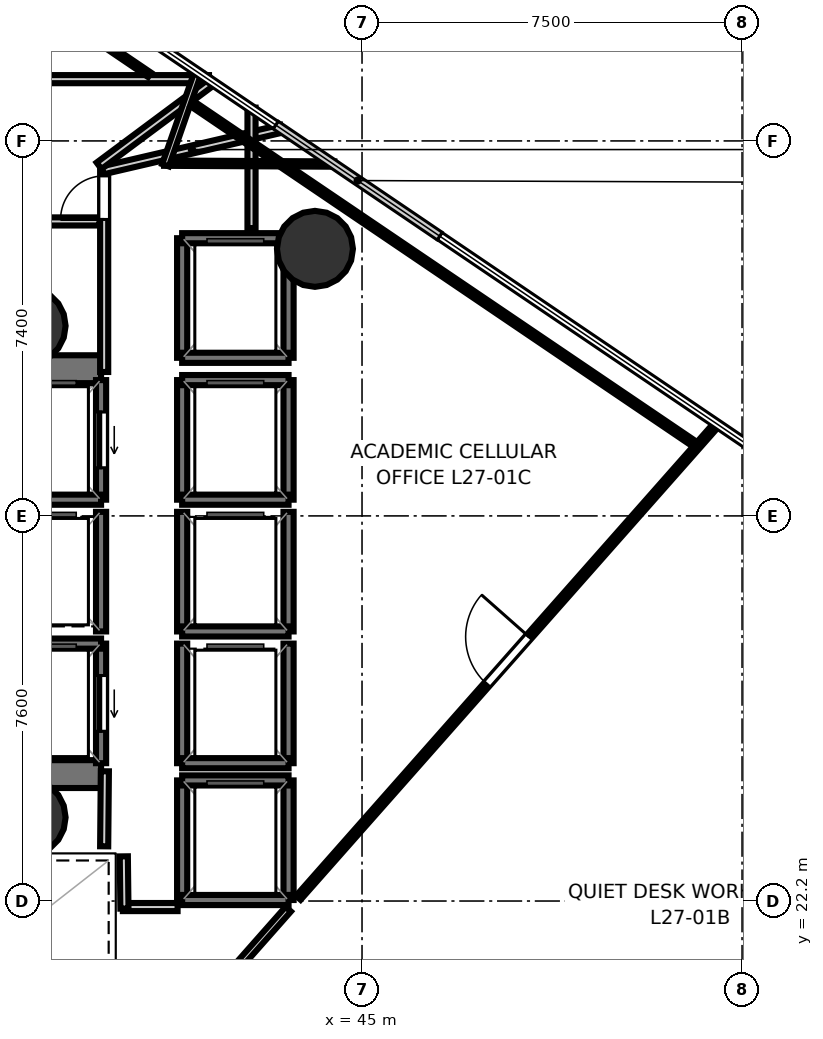
"""IFC4 building model, lengths in metres.
Left out: names, types, materials, properties, quantities, classifications, styles, units other than length and angle.
Written with IfcOpenShell. Run it as: python <this file> out.ifc"""

import sys

from ifc_helpers import new_model, si_unit, direction, frame, frame_2d, origin, origin_2d, place, context, subcontext, project, spatial, rectangle, hollow_circle, extrude, element, fill, save


model = new_model("IFC4")
c1 = context("Model", 3, precision=1e-05, world=origin(), true_north=direction((0.0, 1.0)))
c2 = subcontext(c1, "Body", "Model", "MODEL_VIEW")
j1 = project(units=[si_unit("LENGTHUNIT", "METRE"), si_unit("PLANEANGLEUNIT", "RADIAN")], contexts=[c1])
p1 = place(None, origin())
s1 = spatial("IfcSite", under=j1, at=p1, CompositionType="ELEMENT")
p2 = place(p1, origin())
s2 = spatial("IfcBuilding", under=s1, at=p2, CompositionType="ELEMENT")
p3 = place(p2, frame((0.0, 0.0, 108.9)))
s3 = spatial("IfcBuildingStorey", under=s2, at=p3, CompositionType="ELEMENT", Elevation=108.9)
p4 = place(p3, frame((29.23, 32.695, 0.0), z_axis=(0.0, 0.0, 1.0), x_axis=(1.0, 0.0, 0.0)))
e1 = element("IfcWall", 1, at=p4, inside=s3, PredefinedType="SHEAR", context=c2, shape_type="SweptSolid", body=[
    extrude(rectangle(XDim=10.62, YDim=0.55, at=frame_2d((5.31, 0.0))), origin(), (0.0, 0.0, 1.0), 3.52),
])
p5 = place(p4, frame((0.995, 0.0, 0.0)))
e2 = element("IfcOpeningElement", 2, at=p5, cuts=e1, PredefinedType="OPENING", context=c2, shape_type="SweptSolid", body=[
    extrude(rectangle(XDim=1.25, YDim=2.15, at=frame_2d((0.625, 1.075))), frame((0.0, 0.285, 0.0), z_axis=(0.0, -1.0, 0.0), x_axis=(1.0, 0.0, 0.0)), (0.0, 0.0, 1.0), 0.57),
])
p6 = place(p3, frame((29.23, 24.705, 0.0), z_axis=(0.0, 0.0, 1.0), x_axis=(1.0, 0.0, 0.0)))
e3 = element("IfcWall", 3, at=p6, inside=s3, PredefinedType="SHEAR", context=c2, shape_type="SweptSolid", body=[
    extrude(rectangle(XDim=10.62, YDim=0.55, at=frame_2d((5.31, 0.0))), origin(), (0.0, 0.0, 1.0), 3.52),
])
p7 = place(p6, frame((0.795, 0.0, 0.0)))
e4 = element("IfcOpeningElement", 4, at=p7, cuts=e3, PredefinedType="OPENING", context=c2, shape_type="SweptSolid", body=[
    extrude(rectangle(XDim=1.25, YDim=2.15, at=frame_2d((0.625, 1.075))), frame((0.0, 0.285, 0.0), z_axis=(0.0, -1.0, 0.0), x_axis=(1.0, 0.0, 0.0)), (0.0, 0.0, 1.0), 0.57),
])
for number, where, z_axis, x_axis in (
    (5, (38.4, 33.55, 0.0), (0.0, 0.0, 1.0), (1.0, 0.0, 0.0)),
    (6, (38.4, 23.85, 0.0), (0.0, 0.0, 1.0), (1.0, 0.0, 0.0)),
    (7, (44.071, 35.07, 0.0), (0.0, 0.0, 1.0), (1.0, 0.0, 0.0)),
):
    element("IfcColumn", number, at=place(p3, frame(where, z_axis=z_axis, x_axis=x_axis)), inside=s3, PredefinedType="COLUMN", context=c2, shape_type="SweptSolid", body=[
        extrude(hollow_circle(Radius=0.75, WallThickness=0.036, at=origin_2d()), origin(), (0.0, 0.0, 1.0), 3.7),
    ])
p8 = place(p3, frame((39.85, 30.12, 0.0), z_axis=(0.0, 0.0, 1.0), x_axis=(0.0, 1.0, 0.0)))
e8 = element("IfcWall", 8, at=p8, inside=s3, PredefinedType="SOLIDWALL", context=c2, shape_type="SweptSolid", body=[
    extrude(rectangle(XDim=2.36, YDim=0.2, at=frame_2d((1.18, 0.0))), origin(), (0.0, 0.0, 1.0), 3.52),
])
p9 = place(p8, frame((0.63, 0.0, 0.0)))
e9 = element("IfcOpeningElement", 9, at=p9, cuts=e8, PredefinedType="OPENING", context=c2, shape_type="SweptSolid", body=[
    extrude(rectangle(XDim=1.1, YDim=2.15, at=frame_2d((0.55, 1.075))), frame((0.0, 0.11, 0.0), z_axis=(0.0, -1.0, 0.0), x_axis=(1.0, 0.0, 0.0)), (0.0, 0.0, 1.0), 0.22),
])
p10 = place(p3, frame((37.75, 30.12, 0.0), z_axis=(0.0, 0.0, 1.0), x_axis=(1.0, 0.0, 0.0)))
e10 = element("IfcWall", 10, at=p10, inside=s3, PredefinedType="SOLIDWALL", context=c2, shape_type="SweptSolid", body=[
    extrude(rectangle(XDim=2.1, YDim=0.2, at=frame_2d((1.05, 0.0))), origin(), (0.0, 0.0, 1.0), 3.52),
])
p11 = place(p3, frame((39.85, 24.92, 0.0), z_axis=(0.0, 0.0, 1.0), x_axis=(0.0, 1.0, 0.0)))
e11 = element("IfcWall", 11, at=p11, inside=s3, PredefinedType="SOLIDWALL", context=c2, shape_type="SweptSolid", body=[
    extrude(rectangle(XDim=2.36, YDim=0.2, at=frame_2d((1.18, 0.0))), origin(), (0.0, 0.0, 1.0), 3.52),
])
p12 = place(p11, frame((0.63, 0.0, 0.0)))
e12 = element("IfcOpeningElement", 12, at=p12, cuts=e11, PredefinedType="OPENING", context=c2, shape_type="SweptSolid", body=[
    extrude(rectangle(XDim=1.1, YDim=2.15, at=frame_2d((0.55, 1.075))), frame((0.0, 0.11, 0.0), z_axis=(0.0, -1.0, 0.0), x_axis=(1.0, 0.0, 0.0)), (0.0, 0.0, 1.0), 0.22),
])
p13 = place(p3, frame((37.75, 27.28, 0.0), z_axis=(0.0, 0.0, 1.0), x_axis=(1.0, 0.0, 0.0)))
e13 = element("IfcWall", 13, at=p13, inside=s3, PredefinedType="SOLIDWALL", context=c2, shape_type="SweptSolid", body=[
    extrude(rectangle(XDim=2.1, YDim=0.2, at=frame_2d((1.05, 0.0))), origin(), (0.0, 0.0, 1.0), 3.52),
])
for number, where, z_axis, x_axis in (
    (14, (43.55, 30.12, 0.0), (0.0, 0.0, 1.0), (0.0, 1.0, 0.0)),
    (15, (41.45, 30.12, 0.0), (0.0, 0.0, 1.0), (0.0, 1.0, 0.0)),
):
    element("IfcWall", number, at=place(p3, frame(where, z_axis=z_axis, x_axis=x_axis)), inside=s3, PredefinedType="SOLIDWALL", context=c2, shape_type="SweptSolid", body=[
        extrude(rectangle(XDim=2.36, YDim=0.2, at=frame_2d((1.18, 0.0))), origin(), (0.0, 0.0, 1.0), 3.52),
    ])
for number, where, z_axis, x_axis in (
    (16, (41.45, 32.48, 0.0), (0.0, 0.0, 1.0), (1.0, 0.0, 0.0)),
    (17, (41.45, 30.12, 0.0), (0.0, 0.0, 1.0), (1.0, 0.0, 0.0)),
):
    element("IfcWall", number, at=place(p3, frame(where, z_axis=z_axis, x_axis=x_axis)), inside=s3, PredefinedType="SOLIDWALL", context=c2, shape_type="SweptSolid", body=[
        extrude(rectangle(XDim=2.1, YDim=0.2, at=frame_2d((1.05, 0.0))), origin(), (0.0, 0.0, 1.0), 3.52),
    ])
for number, where, z_axis, x_axis in (
    (18, (43.55, 27.52, 0.0), (0.0, 0.0, 1.0), (0.0, 1.0, 0.0)),
    (19, (41.45, 27.52, 0.0), (0.0, 0.0, 1.0), (0.0, 1.0, 0.0)),
):
    element("IfcWall", number, at=place(p3, frame(where, z_axis=z_axis, x_axis=x_axis)), inside=s3, PredefinedType="SOLIDWALL", context=c2, shape_type="SweptSolid", body=[
        extrude(rectangle(XDim=2.36, YDim=0.2, at=frame_2d((1.18, 0.0))), origin(), (0.0, 0.0, 1.0), 3.52),
    ])
p14 = place(p3, frame((41.45, 27.52, 0.0), z_axis=(0.0, 0.0, 1.0), x_axis=(1.0, 0.0, 0.0)))
e20 = element("IfcWall", 20, at=p14, inside=s3, PredefinedType="SOLIDWALL", context=c2, shape_type="SweptSolid", body=[
    extrude(rectangle(XDim=2.1, YDim=0.2, at=frame_2d((1.05, 0.0))), origin(), (0.0, 0.0, 1.0), 3.52),
])
for number, where, z_axis, x_axis in (
    (21, (43.55, 24.92, 0.0), (0.0, 0.0, 1.0), (0.0, 1.0, 0.0)),
    (22, (41.45, 24.92, 0.0), (0.0, 0.0, 1.0), (0.0, 1.0, 0.0)),
):
    element("IfcWall", number, at=place(p3, frame(where, z_axis=z_axis, x_axis=x_axis)), inside=s3, PredefinedType="SOLIDWALL", context=c2, shape_type="SweptSolid", body=[
        extrude(rectangle(XDim=2.36, YDim=0.2, at=frame_2d((1.18, 0.0))), origin(), (0.0, 0.0, 1.0), 3.52),
    ])
p15 = place(p3, frame((41.45, 24.92, 0.0), z_axis=(0.0, 0.0, 1.0), x_axis=(1.0, 0.0, 0.0)))
e23 = element("IfcWall", 23, at=p15, inside=s3, PredefinedType="SOLIDWALL", context=c2, shape_type="SweptSolid", body=[
    extrude(rectangle(XDim=2.1, YDim=0.2, at=frame_2d((1.05, 0.0))), origin(), (0.0, 0.0, 1.0), 3.52),
])
p16 = place(p3, frame((39.85, 27.52, 0.0), z_axis=(0.0, 0.0, 1.0), x_axis=(0.0, 1.0, 0.0)))
e24 = element("IfcWall", 24, at=p16, inside=s3, PredefinedType="SOLIDWALL", context=c2, shape_type="SweptSolid", body=[
    extrude(rectangle(XDim=2.36, YDim=0.2, at=frame_2d((1.18, 0.0))), origin(), (0.0, 0.0, 1.0), 3.52),
])
for number, where, z_axis, x_axis in (
    (25, (43.55, 22.22, 0.0), (0.0, 0.0, 1.0), (0.0, 1.0, 0.0)),
    (26, (41.45, 22.22, 0.0), (0.0, 0.0, 1.0), (0.0, 1.0, 0.0)),
):
    element("IfcWall", number, at=place(p3, frame(where, z_axis=z_axis, x_axis=x_axis)), inside=s3, PredefinedType="SOLIDWALL", context=c2, shape_type="SweptSolid", body=[
        extrude(rectangle(XDim=2.36, YDim=0.2, at=frame_2d((1.18, 0.0))), origin(), (0.0, 0.0, 1.0), 3.52),
    ])
for number, where, z_axis, x_axis in (
    (27, (41.45, 24.58, 0.0), (0.0, 0.0, 1.0), (1.0, 0.0, 0.0)),
    (28, (41.45, 22.22, 0.0), (0.0, 0.0, 1.0), (1.0, 0.0, 0.0)),
):
    element("IfcWall", number, at=place(p3, frame(where, z_axis=z_axis, x_axis=x_axis)), inside=s3, PredefinedType="SOLIDWALL", context=c2, shape_type="SweptSolid", body=[
        extrude(rectangle(XDim=2.1, YDim=0.2, at=frame_2d((1.05, 0.0))), origin(), (0.0, 0.0, 1.0), 3.52),
    ])
for number, where, z_axis, x_axis in (
    (29, (43.55, 32.92, 0.0), (0.0, 0.0, 1.0), (0.0, 1.0, 0.0)),
    (30, (41.45, 32.92, 0.0), (0.0, 0.0, 1.0), (0.0, 1.0, 0.0)),
):
    element("IfcWall", number, at=place(p3, frame(where, z_axis=z_axis, x_axis=x_axis)), inside=s3, PredefinedType="SOLIDWALL", context=c2, shape_type="SweptSolid", body=[
        extrude(rectangle(XDim=2.36, YDim=0.2, at=frame_2d((1.18, 0.0))), origin(), (0.0, 0.0, 1.0), 3.52),
    ])
for number, where, z_axis, x_axis in (
    (31, (41.45, 35.28, 0.0), (0.0, 0.0, 1.0), (1.0, 0.0, 0.0)),
    (32, (41.45, 32.92, 0.0), (0.0, 0.0, 1.0), (1.0, 0.0, 0.0)),
):
    element("IfcWall", number, at=place(p3, frame(where, z_axis=z_axis, x_axis=x_axis)), inside=s3, PredefinedType="SOLIDWALL", context=c2, shape_type="SweptSolid", body=[
        extrude(rectangle(XDim=2.1, YDim=0.2, at=frame_2d((1.05, 0.0))), origin(), (0.0, 0.0, 1.0), 3.52),
    ])
p17 = place(p3, frame((39.911, 32.64, 0.0), z_axis=(0.0, 0.0, 1.0), x_axis=(0.0, 1.0, 0.0)))
e33 = element("IfcWall", 33, at=p17, inside=s3, PredefinedType="PARTITIONING", context=c2, shape_type="SweptSolid", body=[
    extrude(rectangle(XDim=4.01, YDim=0.16, at=frame_2d((2.005, 0.0))), origin(), (0.0, 0.0, 1.0), 2.84),
])
p18 = place(p17, frame((3.01, 0.0, 0.0)))
e34 = element("IfcOpeningElement", 34, at=p18, cuts=e33, PredefinedType="OPENING", context=c2, shape_type="SweptSolid", body=[
    extrude(rectangle(XDim=0.86, YDim=2.05, at=frame_2d((0.43, 1.025))), frame((0.0, 0.09, 0.0), z_axis=(0.0, -1.0, 0.0), x_axis=(1.0, 0.0, 0.0)), (0.0, 0.0, 1.0), 0.18),
])
p19 = place(p3, frame((39.88, 36.619, 0.0), z_axis=(0.0, 0.0, 1.0), x_axis=(0.973960950435, 0.2267158288, 0.0)))
e35 = element("IfcWall", 35, at=p19, inside=s3, PredefinedType="PARTITIONING", context=c2, shape_type="SweptSolid", body=[
    extrude(rectangle(XDim=3.62, YDim=0.16, at=frame_2d((1.81, 0.0))), origin(), (0.0, 0.0, 1.0), 2.84),
])
p20 = place(p3, frame((42.819, 37.857, 0.0), z_axis=(0.0, 0.0, 1.0), x_axis=(0.0, -1.0, 0.0)))
e36 = element("IfcWall", 36, at=p20, inside=s3, PredefinedType="PARTITIONING", context=c2, shape_type="SweptSolid", body=[
    extrude(rectangle(XDim=2.377, YDim=0.16, at=frame_2d((1.188, 0.0))), origin(), (0.0, 0.0, 1.0), 2.84),
])
p21 = place(p3, frame((41.36, 22.081, 0.0), z_axis=(0.0, 0.0, 1.0), x_axis=(-1.0, 0.0, 0.0)))
e37 = element("IfcWall", 37, at=p21, inside=s3, PredefinedType="PARTITIONING", context=c2, shape_type="SweptSolid", body=[
    extrude(rectangle(XDim=1.08, YDim=0.16, at=frame_2d((0.54, 0.0))), origin(), (0.0, 0.0, 1.0), 2.84),
])
p22 = place(p3, frame((40.311, 22.05, 0.0), z_axis=(0.0, 0.0, 1.0), x_axis=(-0.011836292006, 0.999929948642, 0.0)))
e38 = element("IfcWall", 38, at=p22, inside=s3, PredefinedType="PARTITIONING", context=c2, shape_type="SweptSolid", body=[
    extrude(rectangle(XDim=1.031, YDim=0.16, at=frame_2d((0.516, 0.0))), origin(), (0.0, 0.0, 1.0), 2.84),
])
p23 = place(p3, frame((39.911, 23.28, 0.0), z_axis=(0.0, 0.0, 1.0), x_axis=(0.009397771291, 0.999955839972, 0.0)))
e39 = element("IfcWall", 39, at=p23, inside=s3, PredefinedType="PARTITIONING", context=c2, shape_type="SweptSolid", body=[
    extrude(rectangle(XDim=1.481, YDim=0.16, at=frame_2d((0.74, 0.0))), origin(), (0.0, 0.0, 1.0), 2.84),
])
p24 = place(p3, frame((26.42, 38.419, 0.0), z_axis=(0.0, 0.0, 1.0), x_axis=(1.0, 0.0, 0.0)))
e40 = element("IfcWall", 40, at=p24, inside=s3, PredefinedType="PARTITIONING", context=c2, shape_type="SweptSolid", body=[
    extrude(rectangle(XDim=15.56, YDim=0.16, at=frame_2d((7.78, 0.0))), origin(), (0.0, 0.0, 1.0), 2.84),
])
p25 = place(p24, frame((10.865, 0.0, 0.0)))
e41 = element("IfcOpeningElement", 41, at=p25, cuts=e40, PredefinedType="OPENING", context=c2, shape_type="SweptSolid", body=[
    extrude(rectangle(XDim=1.25, YDim=2.2, at=frame_2d((0.625, 1.1))), frame((0.0, 0.09, 0.0), z_axis=(0.0, -1.0, 0.0), x_axis=(1.0, 0.0, 0.0)), (0.0, 0.0, 1.0), 0.18),
])
p26 = place(p24, frame((5.532, 0.0, 0.0)))
e42 = element("IfcOpeningElement", 42, at=p26, cuts=e40, PredefinedType="OPENING", context=c2, shape_type="SweptSolid", body=[
    extrude(rectangle(XDim=1.25, YDim=2.2, at=frame_2d((0.625, 1.1))), frame((0.0, 0.09, 0.0), z_axis=(0.0, -1.0, 0.0), x_axis=(1.0, 0.0, 0.0)), (0.0, 0.0, 1.0), 0.18),
])
p27 = place(p3, frame((42.053, 38.379, 0.0), z_axis=(0.0, 0.0, 1.0), x_axis=(-0.802246834953, -0.596992475504, 0.0)))
e43 = element("IfcWall", 43, at=p27, inside=s3, PredefinedType="PARTITIONING", context=c2, shape_type="SweptSolid", body=[
    extrude(rectangle(XDim=2.796, YDim=0.16, at=frame_2d((1.398, 0.0))), origin(), (0.0, 0.0, 1.0), 2.84),
])
p28 = place(p3, frame((39.818, 35.611, 0.0), z_axis=(0.0, 0.0, 1.0), x_axis=(-1.0, 0.0, 0.0)))
e44 = element("IfcWall", 44, at=p28, inside=s3, PredefinedType="PARTITIONING", context=c2, shape_type="SweptSolid", body=[
    extrude(rectangle(XDim=2.768, YDim=0.16, at=frame_2d((1.384, 0.0))), origin(), (0.0, 0.0, 1.0), 2.84),
])
p29 = place(p3, frame((40.303, 18.372, 0.0), z_axis=(0.0, 0.0, 1.0), x_axis=(0.662221894186, 0.749307789136, 0.0)))
e45 = element("IfcWall", 45, at=p29, inside=s3, PredefinedType="PARTITIONING", context=c2, shape_type="SweptSolid", body=[
    extrude(rectangle(XDim=4.895, YDim=0.14, at=frame_2d((2.447, 0.0))), origin(), (0.0, 0.0, 1.0), 2.84),
])
p30 = place(p3, frame((43.743, 22.264, 0.0), z_axis=(0.0, 0.0, 1.0), x_axis=(0.662202897959, 0.749324577159, 0.0)))
e46 = element("IfcWall", 46, at=p30, inside=s3, PredefinedType="PARTITIONING", context=c2, shape_type="SweptSolid", body=[
    extrude(rectangle(XDim=12.498, YDim=0.12, at=frame_2d((6.249, 0.0))), origin(), (0.0, 0.0, 1.0), 2.84),
])
p31 = place(p30, frame((5.624, 0.0, 0.0)))
e47 = element("IfcOpeningElement", 47, at=p31, cuts=e46, PredefinedType="OPENING", context=c2, shape_type="SweptSolid", body=[
    extrude(rectangle(XDim=1.25, YDim=2.2, at=frame_2d((0.625, 1.1))), frame((0.0, 0.07, 0.0), z_axis=(0.0, -1.0, 0.0), x_axis=(1.0, 0.0, 0.0)), (0.0, 0.0, 1.0), 0.14),
])
p32 = place(p3, frame((44.454, 36.743, 0.0), z_axis=(0.0, 0.0, 1.0), x_axis=(-0.999986322379, 0.005230205958, 0.0)))
e48 = element("IfcWall", 48, at=p32, inside=s3, PredefinedType="PARTITIONING", context=c2, shape_type="SweptSolid", body=[
    extrude(rectangle(XDim=3.361, YDim=0.105, at=frame_2d((1.68, 0.0))), origin(), (0.0, 0.0, 1.0), 2.84),
])
p33 = place(p3, frame((41.122, 36.72, 0.0), z_axis=(0.0, 0.0, 1.0), x_axis=(0.329225111587, 0.944251463277, 0.0)))
e49 = element("IfcWall", 49, at=p33, inside=s3, PredefinedType="PARTITIONING", context=c2, shape_type="SweptSolid", body=[
    extrude(rectangle(XDim=1.962, YDim=0.14, at=frame_2d((0.981, 0.0))), origin(), (0.0, 0.0, 1.0), 2.84),
])
p34 = place(p3, frame((41.65, 37.933, 0.0), z_axis=(0.0, 0.0, 1.0), x_axis=(0.827941747022, -0.560814107827, 0.0)))
e50 = element("IfcWall", 50, at=p34, inside=s3, PredefinedType="PARTITIONING", context=c2, shape_type="SweptSolid", body=[
    extrude(rectangle(XDim=11.895, YDim=0.12, at=frame_2d((5.948, 0.0))), origin(), (0.0, 0.0, 1.0), 2.84),
])
p35 = place(p3, frame((34.052, 43.08, 0.0), z_axis=(0.0, 0.0, 1.0), x_axis=(0.827934826591, -0.560824324471, 0.0)))
e51 = element("IfcWall", 51, at=p35, inside=s3, PredefinedType="PARTITIONING", context=c2, shape_type="SweptSolid", body=[
    extrude(rectangle(XDim=8.158, YDim=0.105, at=frame_2d((4.079, 0.0))), origin(), (0.0, 0.0, 1.0), 2.84),
])
p36 = place(p9, origin())
e52 = element("IfcDoor", 52, at=p36, inside=s3, OperationType="SLIDING_TO_LEFT", PredefinedType="DOOR", context=c2, shape_type="SweptSolid", body=[
    extrude(rectangle(XDim=1.1, YDim=2.15, at=frame_2d((0.55, 1.075))), frame((0.0, 0.025, 0.0), z_axis=(0.0, -1.0, 0.0), x_axis=(1.0, 0.0, 0.0)), (0.0, 0.0, 1.0), 0.05),
])
fill(e9, e52)
p37 = place(p12, origin())
e53 = element("IfcDoor", 53, at=p37, inside=s3, OperationType="SLIDING_TO_LEFT", PredefinedType="DOOR", context=c2, shape_type="SweptSolid", body=[
    extrude(rectangle(XDim=1.1, YDim=2.15, at=frame_2d((0.55, 1.075))), frame((0.0, 0.025, 0.0), z_axis=(0.0, -1.0, 0.0), x_axis=(1.0, 0.0, 0.0)), (0.0, 0.0, 1.0), 0.05),
])
fill(e12, e53)
p38 = place(p18, origin())
e54 = element("IfcDoor", 54, at=p38, inside=s3, OperationType="SINGLE_SWING_LEFT", PredefinedType="DOOR", context=c2, shape_type="SweptSolid", body=[
    extrude(rectangle(XDim=0.86, YDim=2.05, at=frame_2d((0.43, 1.025))), frame((0.0, 0.025, 0.0), z_axis=(0.0, -1.0, 0.0), x_axis=(1.0, 0.0, 0.0)), (0.0, 0.0, 1.0), 0.05),
])
fill(e34, e54)
p39 = place(p31, origin())
e55 = element("IfcDoor", 55, at=p39, inside=s3, OperationType="SINGLE_SWING_RIGHT", PredefinedType="DOOR", context=c2, shape_type="SweptSolid", body=[
    extrude(rectangle(XDim=1.25, YDim=2.2, at=frame_2d((0.625, 1.1))), frame((0.0, 0.025, 0.0), z_axis=(0.0, -1.0, 0.0), x_axis=(1.0, 0.0, 0.0)), (0.0, 0.0, 1.0), 0.05),
])
fill(e47, e55)
save(model, sys.argv[1])
